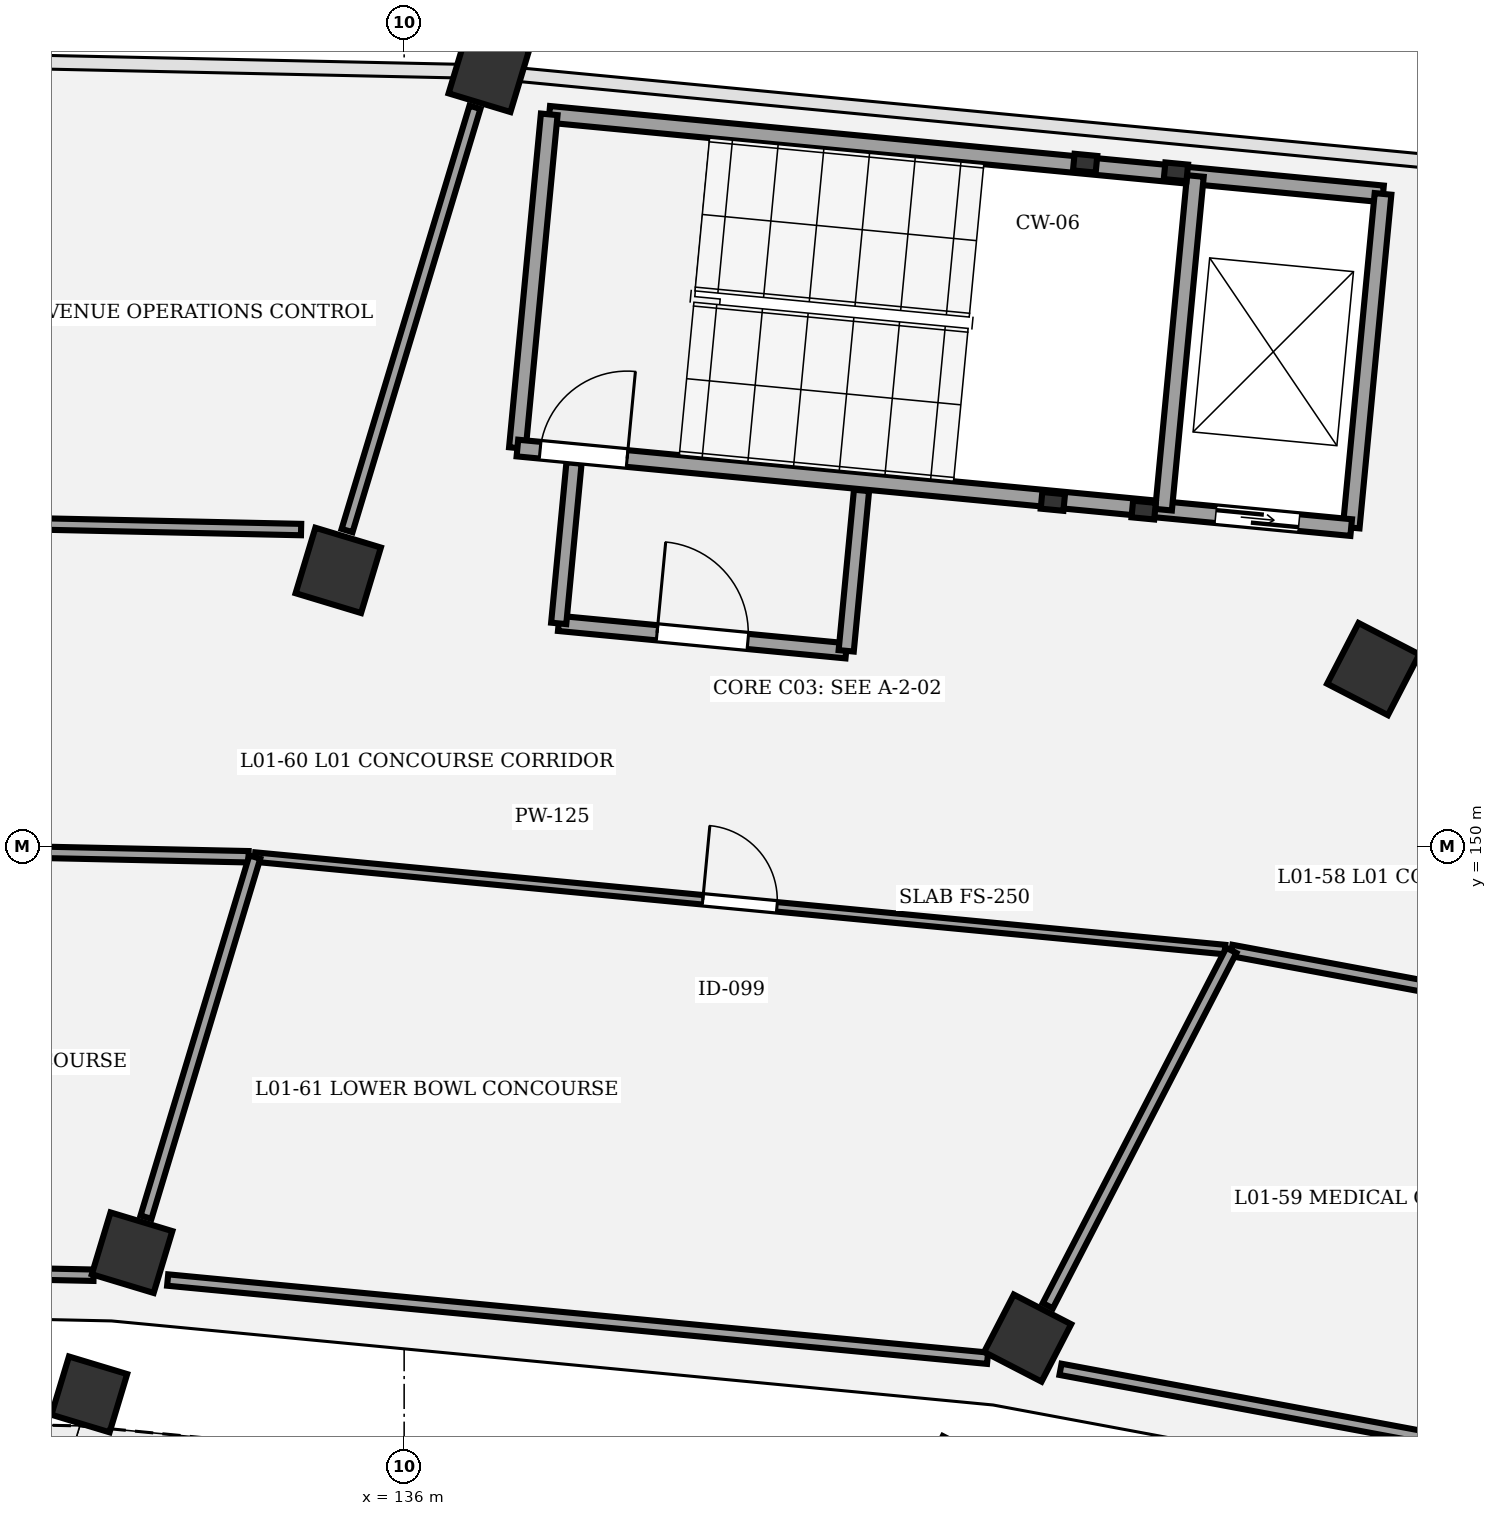
"""IFC4 building model, lengths in metres.
Left out: names, types, materials, properties, quantities, classifications, styles, units other than length and angle.
Written with IfcOpenShell. Run it as: python <this file> out.ifc"""

import sys

from ifc_helpers import new_model, si_unit, direction, frame, frame_2d, origin, origin_2d, place, context, subcontext, project, spatial, rectangle, extrude, element, fill, save


model = new_model("IFC4")
c1 = context("Model", 3, precision=1e-05, world=origin(), true_north=direction((0.0, 1.0)))
c2 = subcontext(c1, "Body", "Model", "MODEL_VIEW")
j1 = project(units=[si_unit("LENGTHUNIT", "METRE"), si_unit("PLANEANGLEUNIT", "RADIAN")], contexts=[c1])
p1 = place(None, origin())
s1 = spatial("IfcSite", under=j1, at=p1, CompositionType="ELEMENT")
p2 = place(p1, origin())
s2 = spatial("IfcBuilding", under=s1, at=p2, CompositionType="ELEMENT")
p3 = place(p2, frame((0.0, 0.0, 5.4)))
s3 = spatial("IfcBuildingStorey", under=s2, at=p3, CompositionType="ELEMENT", Elevation=5.4)
p4 = place(p3, frame((143.259, 141.706, 0.0), z_axis=(0.0, 0.0, 1.0), x_axis=(0.458959712465, 0.888457079624, 0.0)))
e1 = element("IfcColumn", 1, at=p4, inside=s3, PredefinedType="COLUMN", context=c2, shape_type="SweptSolid", body=[
    extrude(rectangle(XDim=0.8, YDim=0.8, at=origin_2d()), origin(), (0.0, 0.0, 1.0), 4.8),
])
p5 = place(p3, frame((144.204, 143.534, 0.0), z_axis=(0.0, 0.0, 1.0), x_axis=(0.458959712465, 0.888457079624, 0.0)))
e2 = element("IfcColumn", 2, at=p5, inside=s3, PredefinedType="COLUMN", context=c2, shape_type="SweptSolid", body=[
    extrude(rectangle(XDim=0.85, YDim=0.85, at=origin_2d()), origin(), (0.0, 0.0, 1.0), 4.8),
])
p6 = place(p3, frame((148.75, 152.335, 0.0), z_axis=(0.0, 0.0, 1.0), x_axis=(0.458959712465, 0.888457079624, 0.0)))
e3 = element("IfcColumn", 3, at=p6, inside=s3, PredefinedType="COLUMN", context=c2, shape_type="SweptSolid", body=[
    extrude(rectangle(XDim=0.9, YDim=0.9, at=origin_2d()), origin(), (0.0, 0.0, 1.0), 4.8),
])
p7 = place(p3, frame((131.857, 142.793, 0.0), z_axis=(0.0, 0.0, 1.0), x_axis=(0.289198876314, 0.957269037387, 0.0)))
e4 = element("IfcColumn", 4, at=p7, inside=s3, PredefinedType="COLUMN", context=c2, shape_type="SweptSolid", body=[
    extrude(rectangle(XDim=0.8, YDim=0.8, at=origin_2d()), origin(), (0.0, 0.0, 1.0), 4.8),
])
p8 = place(p3, frame((132.42, 144.657, 0.0), z_axis=(0.0, 0.0, 1.0), x_axis=(0.289198876314, 0.957269037387, 0.0)))
e5 = element("IfcColumn", 5, at=p8, inside=s3, PredefinedType="COLUMN", context=c2, shape_type="SweptSolid", body=[
    extrude(rectangle(XDim=0.85, YDim=0.85, at=origin_2d()), origin(), (0.0, 0.0, 1.0), 4.8),
])
p9 = place(p3, frame((135.133, 153.634, 0.0), z_axis=(0.0, 0.0, 1.0), x_axis=(0.289198876314, 0.957269037387, 0.0)))
e6 = element("IfcColumn", 6, at=p9, inside=s3, PredefinedType="COLUMN", context=c2, shape_type="SweptSolid", body=[
    extrude(rectangle(XDim=0.9, YDim=0.9, at=origin_2d()), origin(), (0.0, 0.0, 1.0), 4.8),
])
p10 = place(p3, frame((137.115, 160.194, 0.0), z_axis=(0.0, 0.0, 1.0), x_axis=(0.289198876314, 0.957269037387, 0.0)))
e7 = element("IfcColumn", 7, at=p10, inside=s3, PredefinedType="COLUMN", context=c2, shape_type="SweptSolid", body=[
    extrude(rectangle(XDim=0.85, YDim=0.85, at=origin_2d()), origin(), (0.0, 0.0, 1.0), 4.8),
])
for number, where, z_axis, x_axis in (
    (8, (144.535, 154.541, 0.0), (0.0, 0.0, 1.0), (0.995, -0.095, 0.0)),
    (9, (145.73, 154.427, 0.0), (0.0, 0.0, 1.0), (0.995, -0.095, 0.0)),
    (10, (146.154, 158.877, 0.0), (0.0, 0.0, 1.0), (0.995, -0.095, 0.0)),
    (11, (144.96, 158.991, 0.0), (0.0, 0.0, 1.0), (0.995, -0.095, 0.0)),
):
    element("IfcColumn", number, at=place(p3, frame(where, z_axis=z_axis, x_axis=x_axis)), inside=s3, PredefinedType="COLUMN", context=c2, shape_type="SweptSolid", body=[
        extrude(rectangle(XDim=0.3, YDim=0.22, at=origin_2d()), origin(), (0.0, 0.0, 1.0), 4.8),
    ])
p11 = place(p3, frame((137.909, 159.634, 0.0), z_axis=(0.0, 0.0, 1.0), x_axis=(0.99547962713, -0.094975322952, 0.0)))
e12 = element("IfcWall", 12, at=p11, inside=s3, PredefinedType="SHEAR", context=c2, shape_type="SweptSolid", body=[
    extrude(rectangle(XDim=11.02, YDim=0.22, at=frame_2d((5.51, 0.0))), origin(), (0.0, 0.0, 1.0), 4.55),
])
p12 = place(p3, frame((137.49, 155.243, 0.0), z_axis=(0.0, 0.0, 1.0), x_axis=(0.094997189401, 0.995477540684, 0.0)))
e13 = element("IfcWall", 13, at=p12, inside=s3, PredefinedType="SHEAR", context=c2, shape_type="SweptSolid", body=[
    extrude(rectangle(XDim=4.41, YDim=0.22, at=frame_2d((2.205, 0.0))), origin(), (0.0, 0.0, 1.0), 4.55),
])
p13 = place(p3, frame((148.46, 154.197, 0.0), z_axis=(0.0, 0.0, 1.0), x_axis=(0.095002424918, 0.995477041051, 0.0)))
e14 = element("IfcWall", 14, at=p13, inside=s3, PredefinedType="SHEAR", context=c2, shape_type="SweptSolid", body=[
    extrude(rectangle(XDim=4.41, YDim=0.22, at=frame_2d((2.205, 0.0))), origin(), (0.0, 0.0, 1.0), 4.55),
])
p14 = place(p3, frame((137.49, 155.243, 0.0), z_axis=(0.0, 0.0, 1.0), x_axis=(0.995481721489, -0.094953368458, 0.0)))
e15 = element("IfcWall", 15, at=p14, inside=s3, PredefinedType="SHEAR", context=c2, shape_type="SweptSolid", body=[
    extrude(rectangle(XDim=11.02, YDim=0.22, at=frame_2d((5.51, 0.0))), origin(), (0.0, 0.0, 1.0), 4.55),
])
p15 = place(p14, frame((0.3, 0.0, 0.0)))
e16 = element("IfcOpeningElement", 16, at=p15, cuts=e15, PredefinedType="OPENING", context=c2, shape_type="SweptSolid", body=[
    extrude(rectangle(XDim=1.15, YDim=2.15, at=frame_2d((0.575, 1.075))), frame((0.0, 0.12, 0.0), z_axis=(0.0, -1.0, 0.0), x_axis=(1.0, 0.0, 0.0)), (0.0, 0.0, 1.0), 0.24),
])
p16 = place(p14, frame((9.23, 0.0, 0.0)))
e17 = element("IfcOpeningElement", 17, at=p16, cuts=e15, PredefinedType="OPENING", context=c2, shape_type="SweptSolid", body=[
    extrude(rectangle(XDim=1.1, YDim=2.15, at=frame_2d((0.55, 1.075))), frame((0.0, 0.12, 0.0), z_axis=(0.0, -1.0, 0.0), x_axis=(1.0, 0.0, 0.0)), (0.0, 0.0, 1.0), 0.24),
])
p17 = place(p3, frame((145.991, 154.432, 0.0), z_axis=(0.0, 0.0, 1.0), x_axis=(0.094997189401, 0.995477540684, 0.0)))
e18 = element("IfcWall", 18, at=p17, inside=s3, PredefinedType="SHEAR", context=c2, shape_type="SweptSolid", body=[
    extrude(rectangle(XDim=4.41, YDim=0.22, at=frame_2d((2.205, 0.0))), origin(), (0.0, 0.0, 1.0), 4.55),
])
p18 = place(p3, frame((138.033, 152.937, 0.0), z_axis=(0.0, 0.0, 1.0), x_axis=(0.995481022971, -0.094960691361, 0.0)))
e19 = element("IfcWall", 19, at=p18, inside=s3, PredefinedType="PARTITIONING", context=c2, shape_type="SweptSolid", body=[
    extrude(rectangle(XDim=3.8, YDim=0.2, at=frame_2d((1.9, 0.0))), origin(), (0.0, 0.0, 1.0), 3.65),
])
p19 = place(p18, frame((1.3, 0.0, 0.0)))
e20 = element("IfcOpeningElement", 20, at=p19, cuts=e19, PredefinedType="OPENING", context=c2, shape_type="SweptSolid", body=[
    extrude(rectangle(XDim=1.2, YDim=2.18, at=frame_2d((0.6, 1.09))), frame((0.0, 0.11, 0.0), z_axis=(0.0, -1.0, 0.0), x_axis=(1.0, 0.0, 0.0)), (0.0, 0.0, 1.0), 0.22),
])
for number, where, z_axis, x_axis in (
    (21, (138.033, 152.937, 0.0), (0.0, 0.0, 1.0), (0.095, 0.995, 0.0)),
    (22, (141.816, 152.576, 0.0), (0.0, 0.0, 1.0), (0.095, 0.995, 0.0)),
):
    element("IfcWall", number, at=place(p3, frame(where, z_axis=z_axis, x_axis=x_axis)), inside=s3, PredefinedType="PARTITIONING", context=c2, shape_type="SweptSolid", body=[
        extrude(rectangle(XDim=2.12, YDim=0.2, at=frame_2d((1.06, 0.0))), origin(), (0.0, 0.0, 1.0), 3.65),
    ])
p20 = place(p3, frame((146.884, 148.635, 0.0), z_axis=(0.0, 0.0, 1.0), x_axis=(0.983097372707, -0.183083466695, 0.0)))
e23 = element("IfcWall", 23, at=p20, inside=s3, PredefinedType="PARTITIONING", context=c2, shape_type="SweptSolid", body=[
    extrude(rectangle(XDim=11.035, YDim=0.15, at=frame_2d((5.517, 0.0))), origin(), (0.0, 0.0, 1.0), 3.55),
])
p21 = place(p20, frame((5.047, 0.0, 0.0)))
e24 = element("IfcOpeningElement", 24, at=p21, cuts=e23, PredefinedType="OPENING", context=c2, shape_type="SweptSolid", body=[
    extrude(rectangle(XDim=0.94, YDim=2.3, at=frame_2d((0.47, 1.15))), frame((0.0, 0.085, 0.0), z_axis=(0.0, -1.0, 0.0), x_axis=(1.0, 0.0, 0.0)), (0.0, 0.0, 1.0), 0.17),
])
p22 = place(p3, frame((134.035, 149.862, 0.0), z_axis=(0.0, 0.0, 1.0), x_axis=(0.995485111947, -0.094917816515, 0.0)))
e25 = element("IfcWall", 25, at=p22, inside=s3, PredefinedType="PARTITIONING", context=c2, shape_type="SweptSolid", body=[
    extrude(rectangle(XDim=12.822, YDim=0.125, at=frame_2d((6.411, 0.0))), origin(), (0.0, 0.0, 1.0), 3.55),
])
p23 = place(p22, frame((5.921, 0.0, 0.0)))
e26 = element("IfcOpeningElement", 26, at=p23, cuts=e25, PredefinedType="OPENING", context=c2, shape_type="SweptSolid", body=[
    extrude(rectangle(XDim=0.98, YDim=2.3, at=frame_2d((0.49, 1.15))), frame((0.0, 0.073, 0.0), z_axis=(0.0, -1.0, 0.0), x_axis=(1.0, 0.0, 0.0)), (0.0, 0.0, 1.0), 0.145),
])
p24 = place(p3, frame((115.04, 150.274, 0.0), z_axis=(0.0, 0.0, 1.0), x_axis=(0.999768266483, -0.021527037261, 0.0)))
e27 = element("IfcWall", 27, at=p24, inside=s3, PredefinedType="PARTITIONING", context=c2, shape_type="SweptSolid", body=[
    extrude(rectangle(XDim=18.917, YDim=0.15, at=frame_2d((9.458, 0.0))), origin(), (0.0, 0.0, 1.0), 3.55),
])
p25 = place(p24, frame((8.948, 0.0, 0.0)))
e28 = element("IfcOpeningElement", 28, at=p25, cuts=e27, PredefinedType="OPENING", context=c2, shape_type="SweptSolid", body=[
    extrude(rectangle(XDim=1.02, YDim=2.3, at=frame_2d((0.51, 1.15))), frame((0.0, 0.085, 0.0), z_axis=(0.0, -1.0, 0.0), x_axis=(1.0, 0.0, 0.0)), (0.0, 0.0, 1.0), 0.17),
])
p26 = place(p3, frame((134.644, 154.171, 0.0), z_axis=(0.0, 0.0, 1.0), x_axis=(-0.999768107727, 0.021534409017, 0.0)))
e29 = element("IfcWall", 29, at=p26, inside=s3, PredefinedType="PARTITIONING", context=c2, shape_type="SweptSolid", body=[
    extrude(rectangle(XDim=19.137, YDim=0.15, at=frame_2d((9.569, 0.0))), origin(), (0.0, 0.0, 1.0), 3.55),
])
p27 = place(p26, frame((9.039, 0.0, 0.0)))
e30 = element("IfcOpeningElement", 30, at=p27, cuts=e29, PredefinedType="OPENING", context=c2, shape_type="SweptSolid", body=[
    extrude(rectangle(XDim=1.06, YDim=2.3, at=frame_2d((0.53, 1.15))), frame((0.0, 0.085, 0.0), z_axis=(0.0, -1.0, 0.0), x_axis=(1.0, 0.0, 0.0)), (0.0, 0.0, 1.0), 0.17),
])
p28 = place(p3, frame((153.679, 141.439, 0.0), z_axis=(0.0, 0.0, 1.0), x_axis=(-0.983094403703, 0.18309940854, 0.0)))
e31 = element("IfcWall", 31, at=p28, inside=s3, PredefinedType="PARTITIONING", context=c2, shape_type="SweptSolid", body=[
    extrude(rectangle(XDim=9.199, YDim=0.15, at=frame_2d((4.6, 0.0))), origin(), (0.0, 0.0, 1.0), 3.55),
])
p29 = place(p3, frame((144.469, 143.96, 0.0), z_axis=(0.0, 0.0, 1.0), x_axis=(0.458978545616, 0.88844735053, 0.0)))
e32 = element("IfcWall", 32, at=p29, inside=s3, PredefinedType="PARTITIONING", context=c2, shape_type="SweptSolid", body=[
    extrude(rectangle(XDim=5.262, YDim=0.15, at=frame_2d((2.631, 0.0))), origin(), (0.0, 0.0, 1.0), 3.55),
])
p30 = place(p3, frame((143.676, 143.269, 0.0), z_axis=(0.0, 0.0, 1.0), x_axis=(-0.995483110957, 0.094938800289, 0.0)))
e33 = element("IfcWall", 33, at=p30, inside=s3, PredefinedType="PARTITIONING", context=c2, shape_type="SweptSolid", body=[
    extrude(rectangle(XDim=10.836, YDim=0.15, at=frame_2d((5.418, 0.0))), origin(), (0.0, 0.0, 1.0), 3.55),
])
p31 = place(p3, frame((132.604, 145.125, 0.0), z_axis=(0.0, 0.0, 1.0), x_axis=(0.289211860613, 0.957265114626, 0.0)))
e34 = element("IfcWall", 34, at=p31, inside=s3, PredefinedType="PARTITIONING", context=c2, shape_type="SweptSolid", body=[
    extrude(rectangle(XDim=4.949, YDim=0.15, at=frame_2d((2.475, 0.0))), origin(), (0.0, 0.0, 1.0), 3.55),
])
p32 = place(p3, frame((131.914, 144.361, 0.0), z_axis=(0.0, 0.0, 1.0), x_axis=(-0.999768337691, 0.021523729954, 0.0)))
e35 = element("IfcWall", 35, at=p32, inside=s3, PredefinedType="PARTITIONING", context=c2, shape_type="SweptSolid", body=[
    extrude(rectangle(XDim=16.425, YDim=0.15, at=frame_2d((8.212, 0.0))), origin(), (0.0, 0.0, 1.0), 3.55),
])
p33 = place(p3, frame((136.932, 159.727, 0.0), z_axis=(0.0, 0.0, 1.0), x_axis=(-0.289195444178, -0.957270074256, 0.0)))
e36 = element("IfcWall", 36, at=p33, inside=s3, PredefinedType="PARTITIONING", context=c2, shape_type="SweptSolid", body=[
    extrude(rectangle(XDim=5.817, YDim=0.15, at=frame_2d((2.909, 0.0))), origin(), (0.0, 0.0, 1.0), 3.55),
])
p34 = place(p15, origin())
e37 = element("IfcDoor", 37, at=p34, inside=s3, OperationType="SINGLE_SWING_RIGHT", PredefinedType="DOOR", context=c2, shape_type="SweptSolid", body=[
    extrude(rectangle(XDim=1.15, YDim=2.15, at=frame_2d((0.575, 1.075))), frame((0.0, 0.025, 0.0), z_axis=(0.0, -1.0, 0.0), x_axis=(1.0, 0.0, 0.0)), (0.0, 0.0, 1.0), 0.05),
])
fill(e16, e37)
p35 = place(p16, origin())
e38 = element("IfcDoor", 38, at=p35, inside=s3, OperationType="DOUBLE_DOOR_SLIDING", PredefinedType="DOOR", context=c2, shape_type="SweptSolid", body=[
    extrude(rectangle(XDim=1.1, YDim=2.15, at=frame_2d((0.55, 1.075))), frame((0.0, 0.025, 0.0), z_axis=(0.0, -1.0, 0.0), x_axis=(1.0, 0.0, 0.0)), (0.0, 0.0, 1.0), 0.05),
])
fill(e17, e38)
p36 = place(p19, origin())
e39 = element("IfcDoor", 39, at=p36, inside=s3, OperationType="SINGLE_SWING_LEFT", PredefinedType="DOOR", context=c2, shape_type="SweptSolid", body=[
    extrude(rectangle(XDim=1.2, YDim=2.18, at=frame_2d((0.6, 1.09))), frame((0.0, 0.025, 0.0), z_axis=(0.0, -1.0, 0.0), x_axis=(1.0, 0.0, 0.0)), (0.0, 0.0, 1.0), 0.05),
])
fill(e20, e39)
p37 = place(p23, origin())
e40 = element("IfcDoor", 40, at=p37, inside=s3, OperationType="SINGLE_SWING_LEFT", PredefinedType="DOOR", context=c2, shape_type="SweptSolid", body=[
    extrude(rectangle(XDim=0.98, YDim=2.3, at=frame_2d((0.49, 1.15))), frame((0.0, 0.025, 0.0), z_axis=(0.0, -1.0, 0.0), x_axis=(1.0, 0.0, 0.0)), (0.0, 0.0, 1.0), 0.05),
])
fill(e26, e40)
save(model, sys.argv[1])
